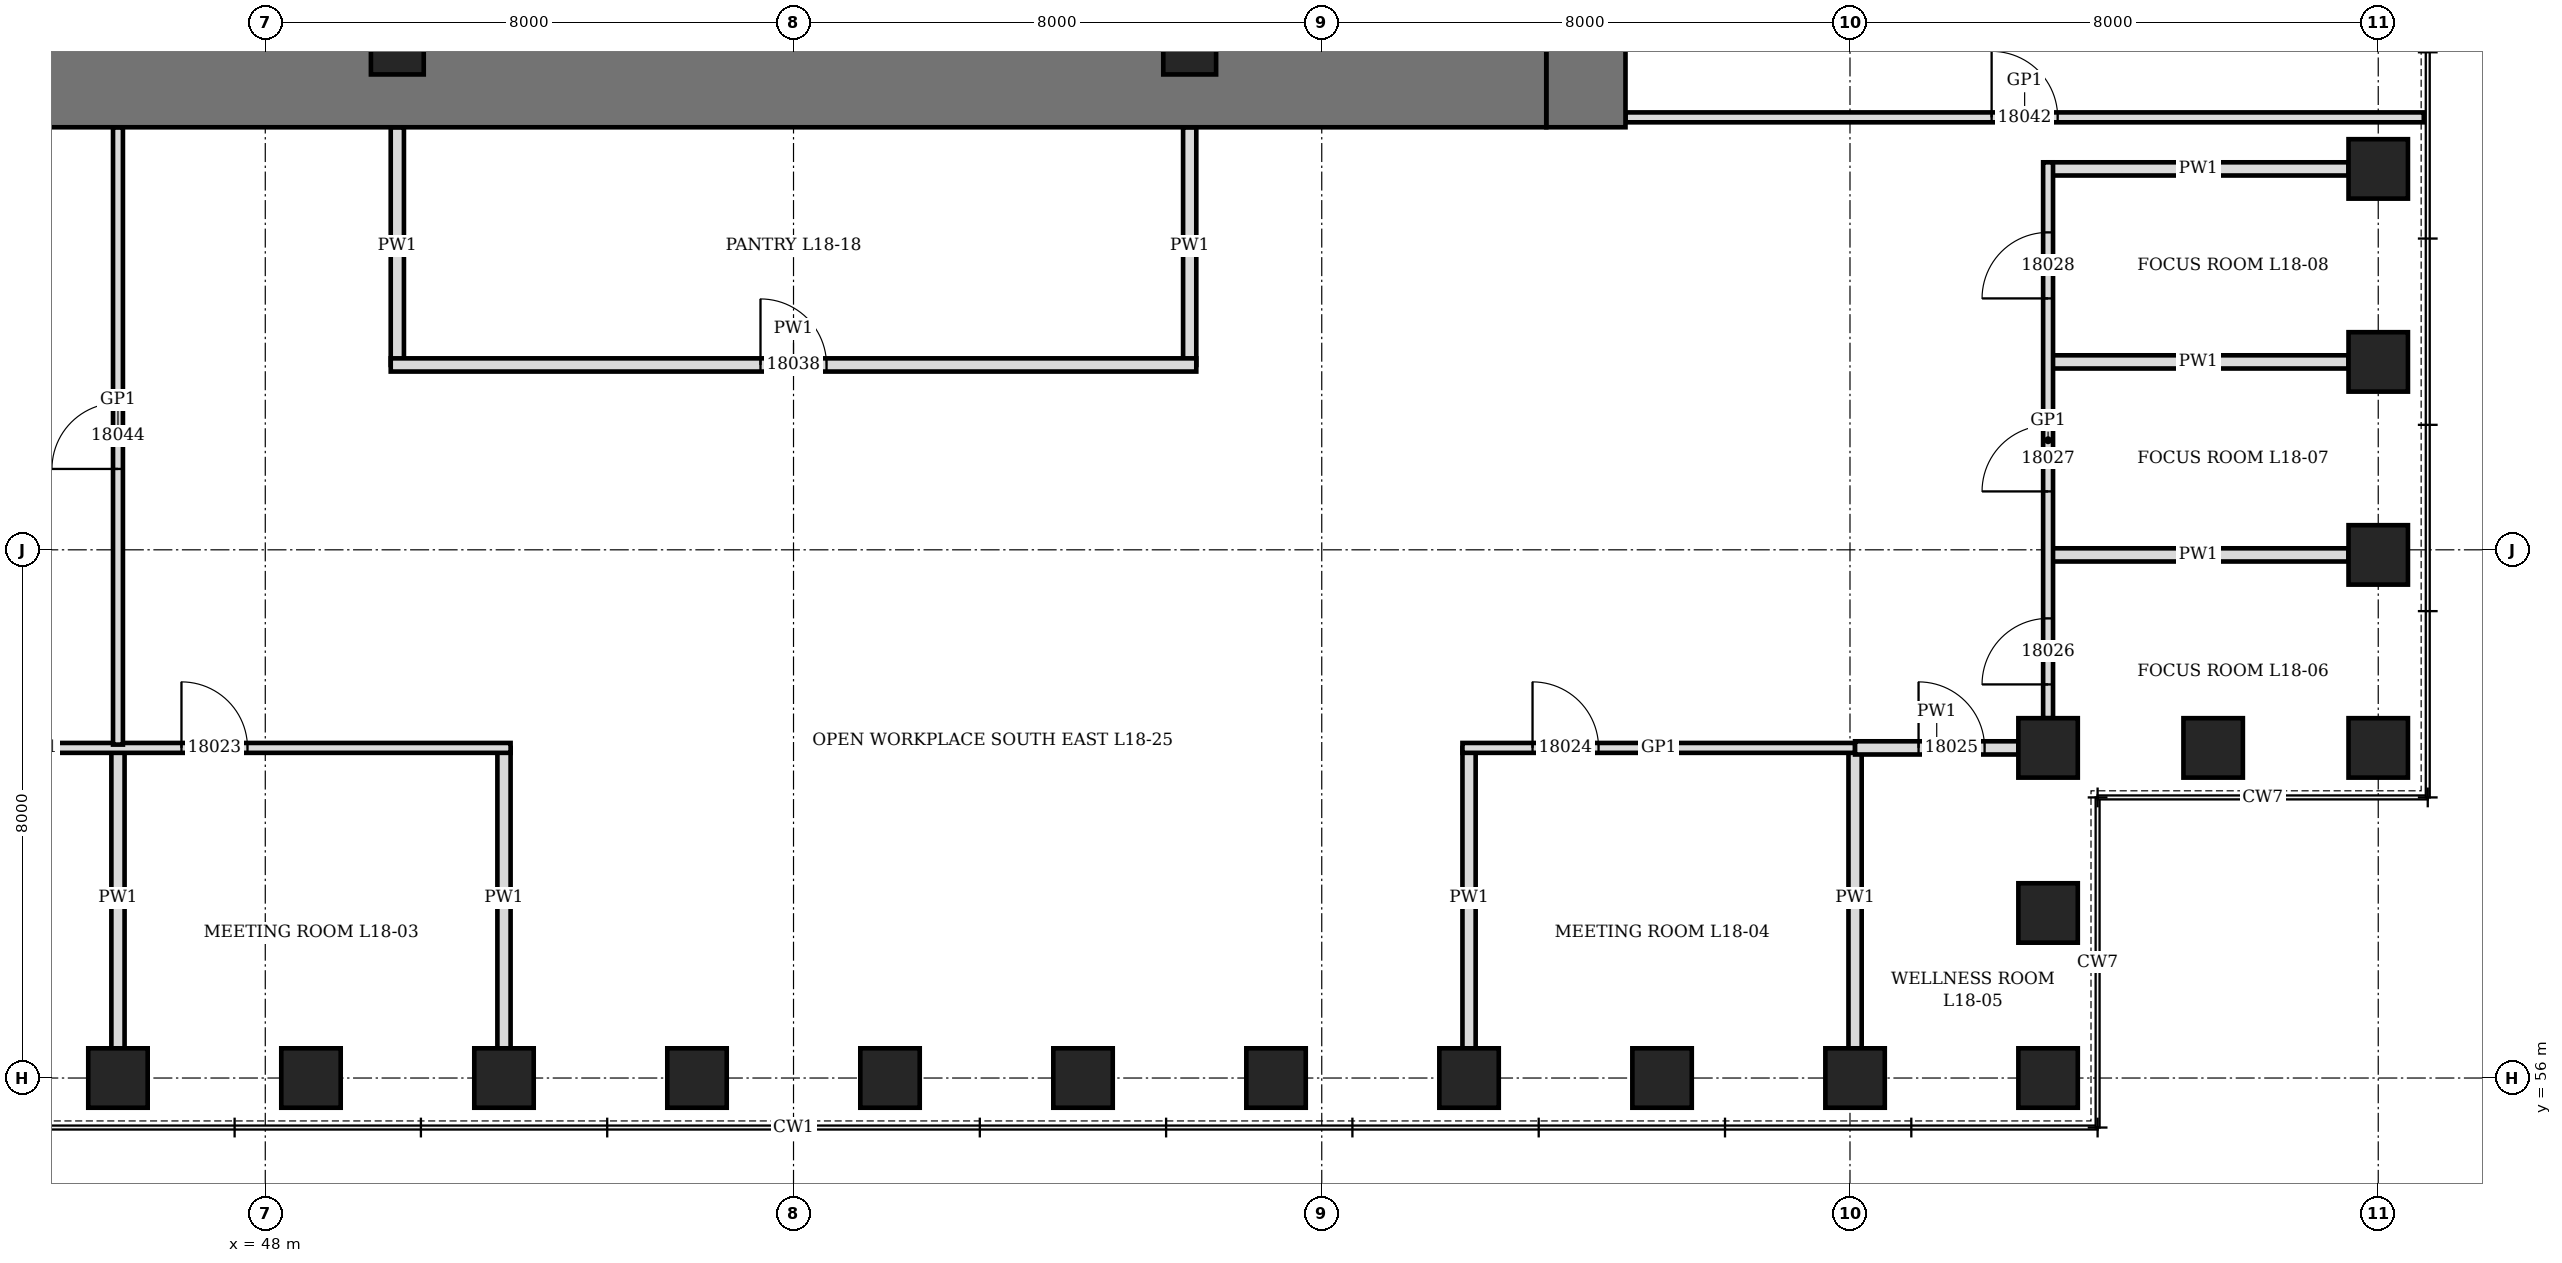
"""IFC4 building model, lengths in metres.
Left out: names, types, materials, properties, quantities, classifications, styles, units other than length and angle.
Written with IfcOpenShell. Run it as: python <this file> out.ifc"""

import sys

from ifc_helpers import new_model, si_unit, direction, frame, frame_2d, origin, origin_2d, place, context, subcontext, project, spatial, rectangle, hollow_rectangle, extrude, element, fill, save


model = new_model("IFC4")
c1 = context("Model", 3, precision=1e-05, world=origin(), true_north=direction((0.0, 1.0)))
c2 = subcontext(c1, "Body", "Model", "MODEL_VIEW")
j1 = project(units=[si_unit("LENGTHUNIT", "METRE"), si_unit("PLANEANGLEUNIT", "RADIAN")], contexts=[c1])
p1 = place(None, origin())
s1 = spatial("IfcSite", under=j1, at=p1, CompositionType="ELEMENT")
p2 = place(p1, origin())
s2 = spatial("IfcBuilding", under=s1, at=p2, CompositionType="ELEMENT")
p3 = place(p2, frame((0.0, 0.0, 85.3)))
s3 = spatial("IfcBuildingStorey", under=s2, at=p3, CompositionType="ELEMENT", Elevation=85.3)
for number, where, z_axis, x_axis in (
    (1, (45.769, 56.0, 0.0), (0.0, 0.0, 1.0), (1.0, 0.0, 0.0)),
    (2, (48.692, 56.0, 0.0), (0.0, 0.0, 1.0), (1.0, 0.0, 0.0)),
    (3, (51.615, 56.0, 0.0), (0.0, 0.0, 1.0), (1.0, 0.0, 0.0)),
    (4, (54.539, 56.0, 0.0), (0.0, 0.0, 1.0), (1.0, 0.0, 0.0)),
    (5, (57.461, 56.0, 0.0), (0.0, 0.0, 1.0), (1.0, 0.0, 0.0)),
    (6, (60.385, 56.0, 0.0), (0.0, 0.0, 1.0), (1.0, 0.0, 0.0)),
    (7, (63.308, 56.0, 0.0), (0.0, 0.0, 1.0), (1.0, 0.0, 0.0)),
    (8, (66.231, 56.0, 0.0), (0.0, 0.0, 1.0), (1.0, 0.0, 0.0)),
    (9, (69.154, 56.0, 0.0), (0.0, 0.0, 1.0), (1.0, 0.0, 0.0)),
    (10, (72.077, 56.0, 0.0), (0.0, 0.0, 1.0), (1.0, 0.0, 0.0)),
    (11, (75.0, 56.0, 0.0), (0.0, 0.0, 1.0), (0.0, 1.0, 0.0)),
    (12, (75.0, 58.5, 0.0), (0.0, 0.0, 1.0), (0.0, 1.0, 0.0)),
    (13, (75.0, 61.0, 0.0), (0.0, 0.0, 1.0), (1.0, 0.0, 0.0)),
    (14, (77.5, 61.0, 0.0), (0.0, 0.0, 1.0), (1.0, 0.0, 0.0)),
    (15, (80.0, 61.0, 0.0), (0.0, 0.0, 1.0), (0.0, 1.0, 0.0)),
    (16, (80.0, 63.923, 0.0), (0.0, 0.0, 1.0), (0.0, 1.0, 0.0)),
    (17, (80.0, 66.846, 0.0), (0.0, 0.0, 1.0), (0.0, 1.0, 0.0)),
    (18, (80.0, 69.769, 0.0), (0.0, 0.0, 1.0), (0.0, 1.0, 0.0)),
):
    element("IfcColumn", number, at=place(p3, frame(where, z_axis=z_axis, x_axis=x_axis)), inside=s3, PredefinedType="COLUMN", context=c2, shape_type="SweptSolid", body=[
        extrude(hollow_rectangle(XDim=0.9, YDim=0.9, WallThickness=0.12, at=origin_2d()), origin(), (0.0, 0.0, 1.0), 4.2),
    ])
p4 = place(p3, frame((68.0, 70.4, 0.0), z_axis=(0.0, 0.0, 1.0), x_axis=(0.0, 1.0, 0.0)))
e19 = element("IfcWall", 19, at=p4, inside=s3, PredefinedType="SHEAR", context=c2, shape_type="SweptSolid", body=[
    extrude(rectangle(XDim=19.2, YDim=1.2, at=frame_2d((9.6, 0.0))), origin(), (0.0, 0.0, 1.0), 4.2),
])
p5 = place(p4, frame((8.6, 0.0, 0.0)))
e20 = element("IfcOpeningElement", 20, at=p5, cuts=e19, PredefinedType="OPENING", context=c2, shape_type="SweptSolid", body=[
    extrude(rectangle(XDim=2.0, YDim=2.4, at=frame_2d((1.0, 1.2))), frame((0.0, 0.61, 0.0), z_axis=(0.0, -1.0, 0.0), x_axis=(1.0, 0.0, 0.0)), (0.0, 0.0, 1.0), 1.22),
])
p6 = place(p3, frame((44.6, 71.0, 0.0), z_axis=(0.0, 0.0, 1.0), x_axis=(1.0, 0.0, 0.0)))
e21 = element("IfcWall", 21, at=p6, inside=s3, PredefinedType="SHEAR", context=c2, shape_type="SweptSolid", body=[
    extrude(rectangle(XDim=22.8, YDim=1.2, at=frame_2d((11.4, 0.0))), origin(), (0.0, 0.0, 1.0), 4.2),
])
for number, where, z_axis, x_axis in (
    (22, (50.0, 71.6, 0.0), (0.0, 0.0, 1.0), (1.0, 0.0, 0.0)),
    (23, (62.0, 71.6, 0.0), (0.0, 0.0, 1.0), (1.0, 0.0, 0.0)),
):
    element("IfcColumn", number, at=place(p3, frame(where, z_axis=z_axis, x_axis=x_axis)), inside=s3, PredefinedType="COLUMN", context=c2, shape_type="SweptSolid", body=[
        extrude(hollow_rectangle(XDim=0.8, YDim=0.8, WallThickness=0.1, at=origin_2d()), origin(), (0.0, 0.0, 1.0), 4.2),
    ])
for number, where, z_axis, x_axis in (
    (24, (45.769, 56.45, 0.0), (0.0, 0.0, 1.0), (0.0, 1.0, 0.0)),
    (25, (51.615, 56.45, 0.0), (0.0, 0.0, 1.0), (0.0, 1.0, 0.0)),
    (26, (66.231, 56.45, 0.0), (0.0, 0.0, 1.0), (0.0, 1.0, 0.0)),
):
    element("IfcWall", number, at=place(p3, frame(where, z_axis=z_axis, x_axis=x_axis)), inside=s3, PredefinedType="PARTITIONING", context=c2, shape_type="SweptSolid", body=[
        extrude(rectangle(XDim=4.55, YDim=0.2, at=frame_2d((2.275, 0.0))), origin(), (0.0, 0.0, 1.0), 3.278),
    ])
for number, where, z_axis, x_axis in (
    (27, (72.077, 56.45, 0.0), (0.0, 0.0, 1.0), (0.0, 1.0, 0.0)),
    (28, (75.0, 63.923, 0.0), (0.0, 0.0, 1.0), (1.0, 0.0, 0.0)),
    (29, (75.0, 66.846, 0.0), (0.0, 0.0, 1.0), (1.0, 0.0, 0.0)),
    (30, (75.0, 69.769, 0.0), (0.0, 0.0, 1.0), (1.0, 0.0, 0.0)),
):
    element("IfcWall", number, at=place(p3, frame(where, z_axis=z_axis, x_axis=x_axis)), inside=s3, PredefinedType="PARTITIONING", context=c2, shape_type="SweptSolid", body=[
        extrude(rectangle(XDim=4.55, YDim=0.2, at=frame_2d((2.275, 0.0))), origin(), (0.0, 0.0, 1.0), 3.428),
    ])
for number, where, z_axis, x_axis in (
    (31, (50.0, 66.8, 0.0), (0.0, 0.0, 1.0), (0.0, 1.0, 0.0)),
    (32, (62.0, 66.8, 0.0), (0.0, 0.0, 1.0), (0.0, 1.0, 0.0)),
):
    element("IfcWall", number, at=place(p3, frame(where, z_axis=z_axis, x_axis=x_axis)), inside=s3, PredefinedType="PARTITIONING", context=c2, shape_type="SweptSolid", body=[
        extrude(rectangle(XDim=3.6, YDim=0.2, at=frame_2d((1.8, 0.0))), origin(), (0.0, 0.0, 1.0), 4.04),
    ])
p7 = place(p3, frame((37.45, 61.0, 0.0), z_axis=(0.0, 0.0, 1.0), x_axis=(1.0, 0.0, 0.0)))
e33 = element("IfcWall", 33, at=p7, inside=s3, PredefinedType="PARTITIONING", context=c2, shape_type="SweptSolid", body=[
    extrude(rectangle(XDim=14.265, YDim=0.15, at=frame_2d((7.133, 0.0))), origin(), (0.0, 0.0, 1.0), 4.04),
])
p8 = place(p7, frame((0.511, 0.0, 0.0)))
e34 = element("IfcOpeningElement", 34, at=p8, cuts=e33, PredefinedType="OPENING", context=c2, shape_type="SweptSolid", body=[
    extrude(rectangle(XDim=1.0, YDim=2.4, at=frame_2d((0.5, 1.2))), frame((0.0, 0.085, 0.0), z_axis=(0.0, -1.0, 0.0), x_axis=(1.0, 0.0, 0.0)), (0.0, 0.0, 1.0), 0.17),
])
p9 = place(p7, frame((3.435, 0.0, 0.0)))
e35 = element("IfcOpeningElement", 35, at=p9, cuts=e33, PredefinedType="OPENING", context=c2, shape_type="SweptSolid", body=[
    extrude(rectangle(XDim=1.0, YDim=2.4, at=frame_2d((0.5, 1.2))), frame((0.0, 0.085, 0.0), z_axis=(0.0, -1.0, 0.0), x_axis=(1.0, 0.0, 0.0)), (0.0, 0.0, 1.0), 0.17),
])
p10 = place(p7, frame((9.281, 0.0, 0.0)))
e36 = element("IfcOpeningElement", 36, at=p10, cuts=e33, PredefinedType="OPENING", context=c2, shape_type="SweptSolid", body=[
    extrude(rectangle(XDim=1.0, YDim=2.4, at=frame_2d((0.5, 1.2))), frame((0.0, 0.085, 0.0), z_axis=(0.0, -1.0, 0.0), x_axis=(1.0, 0.0, 0.0)), (0.0, 0.0, 1.0), 0.17),
])
p11 = place(p3, frame((66.131, 61.0, 0.0), z_axis=(0.0, 0.0, 1.0), x_axis=(1.0, 0.0, 0.0)))
e37 = element("IfcWall", 37, at=p11, inside=s3, PredefinedType="PARTITIONING", context=c2, shape_type="SweptSolid", body=[
    extrude(rectangle(XDim=5.946, YDim=0.15, at=frame_2d((2.973, 0.0))), origin(), (0.0, 0.0, 1.0), 4.04),
])
p12 = place(p11, frame((1.062, 0.0, 0.0)))
e38 = element("IfcOpeningElement", 38, at=p12, cuts=e37, PredefinedType="OPENING", context=c2, shape_type="SweptSolid", body=[
    extrude(rectangle(XDim=1.0, YDim=2.4, at=frame_2d((0.5, 1.2))), frame((0.0, 0.085, 0.0), z_axis=(0.0, -1.0, 0.0), x_axis=(1.0, 0.0, 0.0)), (0.0, 0.0, 1.0), 0.17),
])
p13 = place(p3, frame((72.077, 61.0, 0.0), z_axis=(0.0, 0.0, 1.0), x_axis=(1.0, 0.0, 0.0)))
e39 = element("IfcWall", 39, at=p13, inside=s3, PredefinedType="PARTITIONING", context=c2, shape_type="SweptSolid", body=[
    extrude(rectangle(XDim=2.473, YDim=0.2, at=frame_2d((1.237, 0.0))), origin(), (0.0, 0.0, 1.0), 4.04),
])
p14 = place(p13, frame((0.961, 0.0, 0.0)))
e40 = element("IfcOpeningElement", 40, at=p14, cuts=e39, PredefinedType="OPENING", context=c2, shape_type="SweptSolid", body=[
    extrude(rectangle(XDim=1.0, YDim=2.1, at=frame_2d((0.5, 1.05))), frame((0.0, 0.11, 0.0), z_axis=(0.0, -1.0, 0.0), x_axis=(1.0, 0.0, 0.0)), (0.0, 0.0, 1.0), 0.22),
])
p15 = place(p3, frame((49.9, 66.8, 0.0), z_axis=(0.0, 0.0, 1.0), x_axis=(1.0, 0.0, 0.0)))
e41 = element("IfcWall", 41, at=p15, inside=s3, PredefinedType="PARTITIONING", context=c2, shape_type="SweptSolid", body=[
    extrude(rectangle(XDim=12.2, YDim=0.2, at=frame_2d((6.1, 0.0))), origin(), (0.0, 0.0, 1.0), 4.04),
])
p16 = place(p15, frame((5.6, 0.0, 0.0)))
e42 = element("IfcOpeningElement", 42, at=p16, cuts=e41, PredefinedType="OPENING", context=c2, shape_type="SweptSolid", body=[
    extrude(rectangle(XDim=1.0, YDim=2.1, at=frame_2d((0.5, 1.05))), frame((0.0, 0.11, 0.0), z_axis=(0.0, -1.0, 0.0), x_axis=(1.0, 0.0, 0.0)), (0.0, 0.0, 1.0), 0.22),
])
p17 = place(p3, frame((68.6, 70.55, 0.0), z_axis=(0.0, 0.0, 1.0), x_axis=(1.0, 0.0, 0.0)))
e43 = element("IfcWall", 43, at=p17, inside=s3, PredefinedType="PARTITIONING", context=c2, shape_type="SweptSolid", body=[
    extrude(rectangle(XDim=12.09, YDim=0.15, at=frame_2d((6.045, 0.0))), origin(), (0.0, 0.0, 1.0), 4.04),
])
p18 = place(p17, frame((5.545, 0.0, 0.0)))
e44 = element("IfcOpeningElement", 44, at=p18, cuts=e43, PredefinedType="OPENING", context=c2, shape_type="SweptSolid", body=[
    extrude(rectangle(XDim=1.0, YDim=2.4, at=frame_2d((0.5, 1.2))), frame((0.0, 0.085, 0.0), z_axis=(0.0, -1.0, 0.0), x_axis=(1.0, 0.0, 0.0)), (0.0, 0.0, 1.0), 0.17),
])
p19 = place(p3, frame((45.769, 61.05, 0.0), z_axis=(0.0, 0.0, 1.0), x_axis=(0.0, 1.0, 0.0)))
e45 = element("IfcWall", 45, at=p19, inside=s3, PredefinedType="PARTITIONING", context=c2, shape_type="SweptSolid", body=[
    extrude(rectangle(XDim=9.35, YDim=0.15, at=frame_2d((4.675, 0.0))), origin(), (0.0, 0.0, 1.0), 3.278),
])
p20 = place(p19, frame((4.175, 0.0, 0.0)))
e46 = element("IfcOpeningElement", 46, at=p20, cuts=e45, PredefinedType="OPENING", context=c2, shape_type="SweptSolid", body=[
    extrude(rectangle(XDim=1.0, YDim=2.4, at=frame_2d((0.5, 1.2))), frame((0.0, 0.085, 0.0), z_axis=(0.0, -1.0, 0.0), x_axis=(1.0, 0.0, 0.0)), (0.0, 0.0, 1.0), 0.17),
])
p21 = place(p3, frame((75.0, 61.45, 0.0), z_axis=(0.0, 0.0, 1.0), x_axis=(0.0, 1.0, 0.0)))
e47 = element("IfcWall", 47, at=p21, inside=s3, PredefinedType="PARTITIONING", context=c2, shape_type="SweptSolid", body=[
    extrude(rectangle(XDim=8.419, YDim=0.15, at=frame_2d((4.209, 0.0))), origin(), (0.0, 0.0, 1.0), 4.04),
])
p22 = place(p21, frame((0.511, 0.0, 0.0)))
e48 = element("IfcOpeningElement", 48, at=p22, cuts=e47, PredefinedType="OPENING", context=c2, shape_type="SweptSolid", body=[
    extrude(rectangle(XDim=1.0, YDim=2.4, at=frame_2d((0.5, 1.2))), frame((0.0, 0.085, 0.0), z_axis=(0.0, -1.0, 0.0), x_axis=(1.0, 0.0, 0.0)), (0.0, 0.0, 1.0), 0.17),
])
p23 = place(p21, frame((3.435, 0.0, 0.0)))
e49 = element("IfcOpeningElement", 49, at=p23, cuts=e47, PredefinedType="OPENING", context=c2, shape_type="SweptSolid", body=[
    extrude(rectangle(XDim=1.0, YDim=2.4, at=frame_2d((0.5, 1.2))), frame((0.0, 0.085, 0.0), z_axis=(0.0, -1.0, 0.0), x_axis=(1.0, 0.0, 0.0)), (0.0, 0.0, 1.0), 0.17),
])
p24 = place(p21, frame((6.358, 0.0, 0.0)))
e50 = element("IfcOpeningElement", 50, at=p24, cuts=e47, PredefinedType="OPENING", context=c2, shape_type="SweptSolid", body=[
    extrude(rectangle(XDim=1.0, YDim=2.4, at=frame_2d((0.5, 1.2))), frame((0.0, 0.085, 0.0), z_axis=(0.0, -1.0, 0.0), x_axis=(1.0, 0.0, 0.0)), (0.0, 0.0, 1.0), 0.17),
])
p25 = place(p10, origin())
e51 = element("IfcDoor", 51, at=p25, inside=s3, OperationType="SINGLE_SWING_RIGHT", PredefinedType="DOOR", context=c2, shape_type="SweptSolid", body=[
    extrude(rectangle(XDim=1.0, YDim=2.4, at=frame_2d((0.5, 1.2))), frame((0.0, 0.075, 0.0), z_axis=(0.0, -1.0, 0.0), x_axis=(1.0, 0.0, 0.0)), (0.0, 0.0, 1.0), 0.149),
])
fill(e36, e51)
p26 = place(p12, origin())
e52 = element("IfcDoor", 52, at=p26, inside=s3, OperationType="SINGLE_SWING_RIGHT", PredefinedType="DOOR", context=c2, shape_type="SweptSolid", body=[
    extrude(rectangle(XDim=1.0, YDim=2.4, at=frame_2d((0.5, 1.2))), frame((0.0, 0.075, 0.0), z_axis=(0.0, -1.0, 0.0), x_axis=(1.0, 0.0, 0.0)), (0.0, 0.0, 1.0), 0.149),
])
fill(e38, e52)
p27 = place(p14, origin())
e53 = element("IfcDoor", 53, at=p27, inside=s3, OperationType="SINGLE_SWING_LEFT", PredefinedType="DOOR", context=c2, shape_type="SweptSolid", body=[
    extrude(rectangle(XDim=1.0, YDim=2.1, at=frame_2d((0.5, 1.05))), frame((0.0, 0.1, 0.0), z_axis=(0.0, -1.0, 0.0), x_axis=(1.0, 0.0, 0.0)), (0.0, 0.0, 1.0), 0.199),
])
fill(e40, e53)
p28 = place(p22, origin())
e54 = element("IfcDoor", 54, at=p28, inside=s3, OperationType="SINGLE_SWING_RIGHT", PredefinedType="DOOR", context=c2, shape_type="SweptSolid", body=[
    extrude(rectangle(XDim=1.0, YDim=2.4, at=frame_2d((0.5, 1.2))), frame((0.0, 0.075, 0.0), z_axis=(0.0, -1.0, 0.0), x_axis=(1.0, 0.0, 0.0)), (0.0, 0.0, 1.0), 0.149),
])
fill(e48, e54)
p29 = place(p23, origin())
e55 = element("IfcDoor", 55, at=p29, inside=s3, OperationType="SINGLE_SWING_RIGHT", PredefinedType="DOOR", context=c2, shape_type="SweptSolid", body=[
    extrude(rectangle(XDim=1.0, YDim=2.4, at=frame_2d((0.5, 1.2))), frame((0.0, 0.075, 0.0), z_axis=(0.0, -1.0, 0.0), x_axis=(1.0, 0.0, 0.0)), (0.0, 0.0, 1.0), 0.149),
])
fill(e49, e55)
p30 = place(p24, origin())
e56 = element("IfcDoor", 56, at=p30, inside=s3, OperationType="SINGLE_SWING_RIGHT", PredefinedType="DOOR", context=c2, shape_type="SweptSolid", body=[
    extrude(rectangle(XDim=1.0, YDim=2.4, at=frame_2d((0.5, 1.2))), frame((0.0, 0.075, 0.0), z_axis=(0.0, -1.0, 0.0), x_axis=(1.0, 0.0, 0.0)), (0.0, 0.0, 1.0), 0.149),
])
fill(e50, e56)
p31 = place(p16, origin())
e57 = element("IfcDoor", 57, at=p31, inside=s3, OperationType="SINGLE_SWING_LEFT", PredefinedType="DOOR", context=c2, shape_type="SweptSolid", body=[
    extrude(rectangle(XDim=1.0, YDim=2.1, at=frame_2d((0.5, 1.05))), frame((0.0, 0.1, 0.0), z_axis=(0.0, -1.0, 0.0), x_axis=(1.0, 0.0, 0.0)), (0.0, 0.0, 1.0), 0.199),
])
fill(e42, e57)
p32 = place(p18, origin())
e58 = element("IfcDoor", 58, at=p32, inside=s3, OperationType="SINGLE_SWING_RIGHT", PredefinedType="DOOR", context=c2, shape_type="SweptSolid", body=[
    extrude(rectangle(XDim=1.0, YDim=2.4, at=frame_2d((0.5, 1.2))), frame((0.0, 0.075, 0.0), z_axis=(0.0, -1.0, 0.0), x_axis=(1.0, 0.0, 0.0)), (0.0, 0.0, 1.0), 0.149),
])
fill(e44, e58)
p33 = place(p20, origin())
e59 = element("IfcDoor", 59, at=p33, inside=s3, OperationType="SINGLE_SWING_RIGHT", PredefinedType="DOOR", context=c2, shape_type="SweptSolid", body=[
    extrude(rectangle(XDim=1.0, YDim=2.4, at=frame_2d((0.5, 1.2))), frame((0.0, 0.075, 0.0), z_axis=(0.0, -1.0, 0.0), x_axis=(1.0, 0.0, 0.0)), (0.0, 0.0, 1.0), 0.149),
])
fill(e46, e59)
save(model, sys.argv[1])
